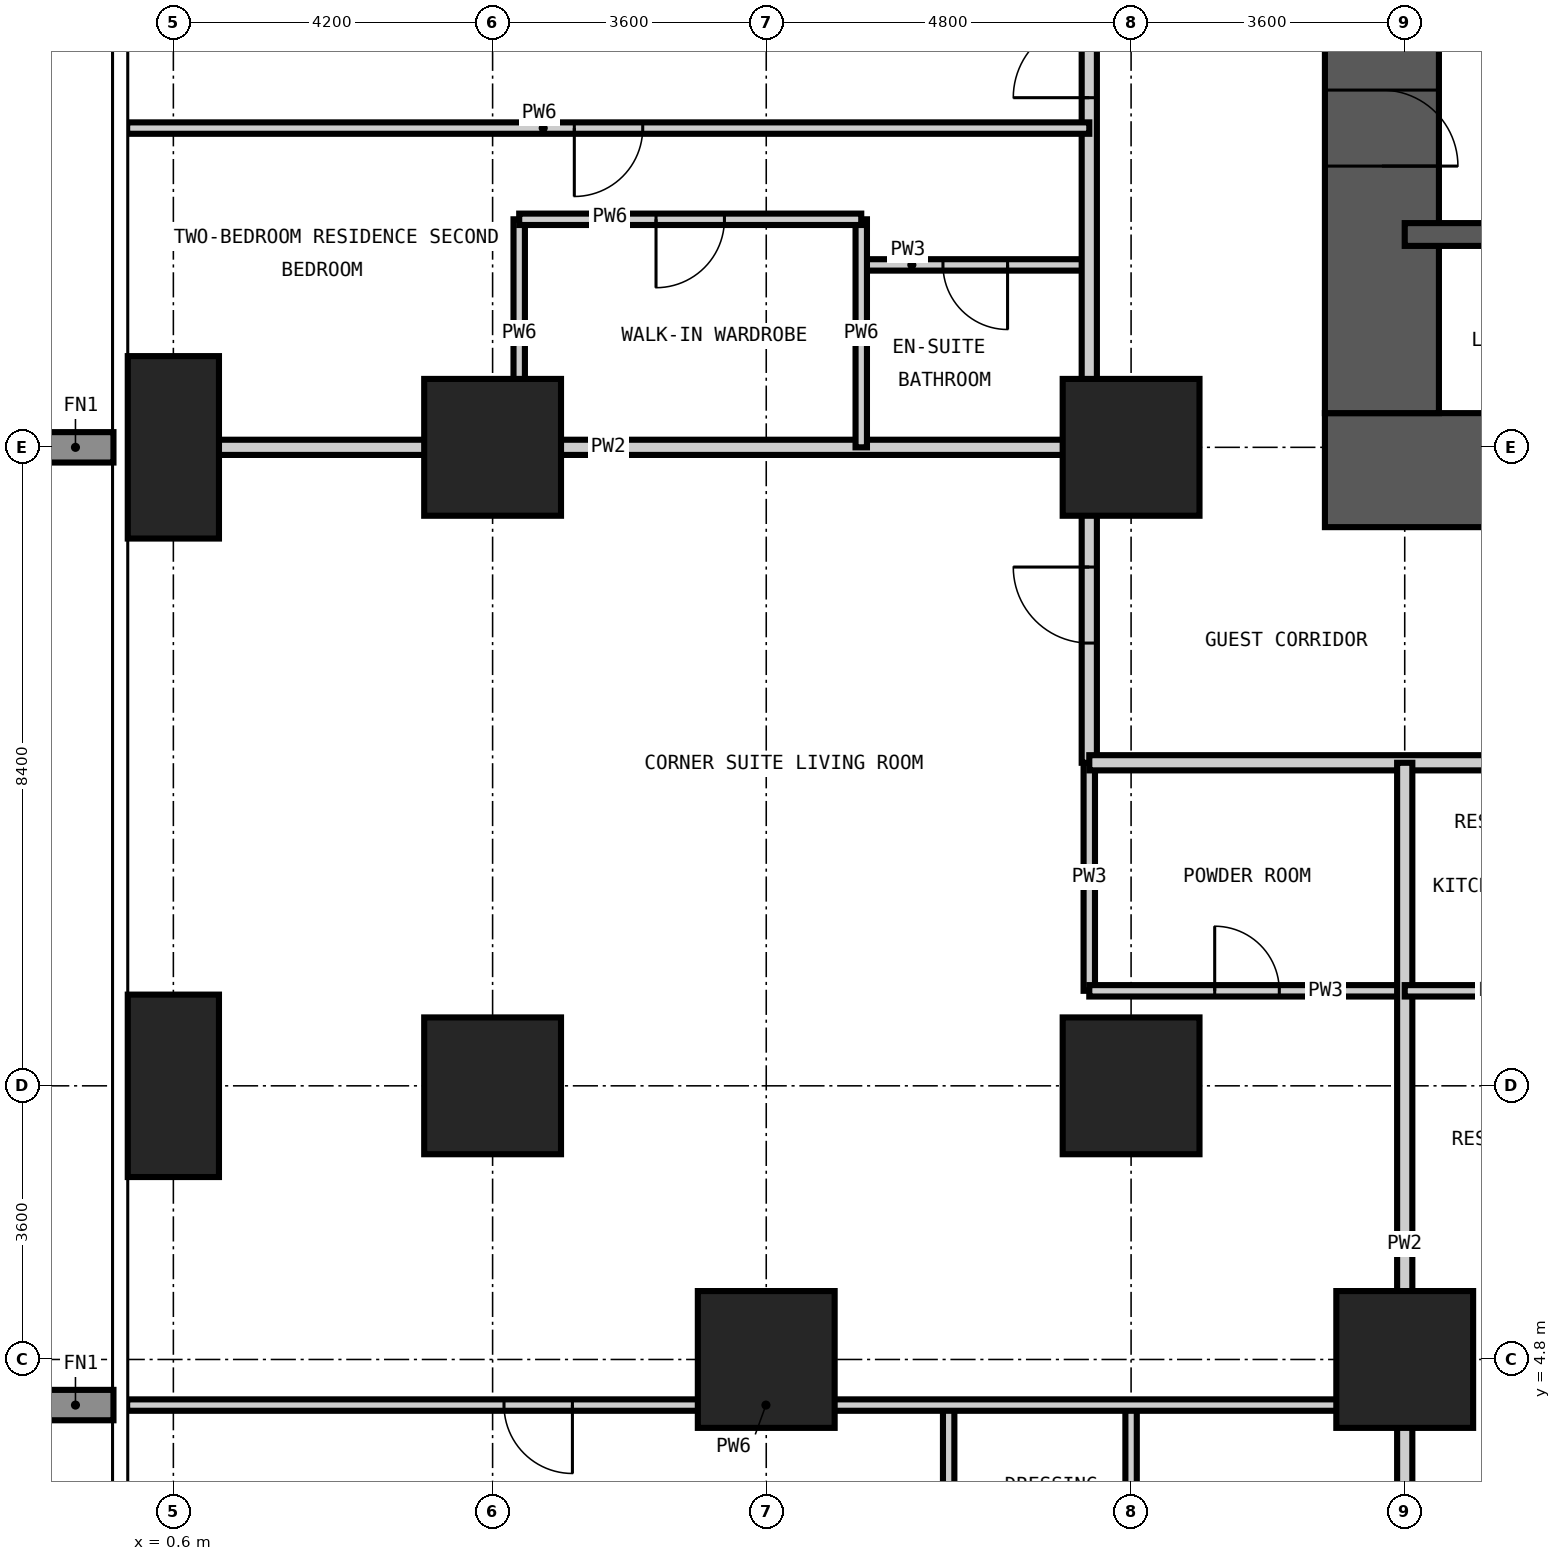
"""IFC4 building model, lengths in metres.
Left out: names, types, materials, properties, quantities, classifications, styles, units other than length and angle.
Written with IfcOpenShell. Run it as: python <this file> out.ifc"""

import sys

from ifc_helpers import new_model, si_unit, direction, frame, frame_2d, origin, origin_2d, place, context, subcontext, project, spatial, rectangle, extrude, element, fill, save


model = new_model("IFC4")
c1 = context("Model", 3, precision=1e-05, world=origin(), true_north=direction((0.0, 1.0)))
c2 = subcontext(c1, "Body", "Model", "MODEL_VIEW")
j1 = project(units=[si_unit("LENGTHUNIT", "METRE"), si_unit("PLANEANGLEUNIT", "RADIAN")], contexts=[c1])
p1 = place(None, origin())
s1 = spatial("IfcSite", under=j1, at=p1, CompositionType="ELEMENT")
p2 = place(p1, origin())
s2 = spatial("IfcBuilding", under=s1, at=p2, CompositionType="ELEMENT")
p3 = place(p2, frame((0.0, 0.0, 52.2)))
s3 = spatial("IfcBuildingStorey", under=s2, at=p3, CompositionType="ELEMENT", Elevation=52.2)
for number, where, z_axis, x_axis in (
    (1, (0.6, 8.4, -0.35), (0.0, 0.0, 1.0), (1.0, 0.0, 0.0)),
    (2, (0.6, 16.8, -0.35), (0.0, 0.0, 1.0), (1.0, 0.0, 0.0)),
):
    element("IfcColumn", number, at=place(p3, frame(where, z_axis=z_axis, x_axis=x_axis)), inside=s3, PredefinedType="COLUMN", context=c2, shape_type="SweptSolid", body=[
        extrude(rectangle(XDim=1.2, YDim=2.4, at=origin_2d()), origin(), (0.0, 0.0, 1.0), 3.6),
    ])
for number, where, z_axis, x_axis in (
    (3, (4.8, 8.4, -0.35), (0.0, 0.0, 1.0), (1.0, 0.0, 0.0)),
    (4, (4.8, 16.8, -0.35), (0.0, 0.0, 1.0), (1.0, 0.0, 0.0)),
    (5, (8.4, 4.8, -0.35), (0.0, 0.0, 1.0), (1.0, 0.0, 0.0)),
    (6, (13.2, 8.4, -0.35), (0.0, 0.0, 1.0), (1.0, 0.0, 0.0)),
    (7, (13.2, 16.8, -0.35), (0.0, 0.0, 1.0), (1.0, 0.0, 0.0)),
    (8, (16.8, 4.8, -0.35), (0.0, 0.0, 1.0), (1.0, 0.0, 0.0)),
):
    element("IfcColumn", number, at=place(p3, frame(where, z_axis=z_axis, x_axis=x_axis)), inside=s3, PredefinedType="COLUMN", context=c2, shape_type="SweptSolid", body=[
        extrude(rectangle(XDim=1.8, YDim=1.8, at=origin_2d()), origin(), (0.0, 0.0, 1.0), 3.6),
    ])
p4 = place(p3, frame((15.75, 16.5, -0.35), z_axis=(0.0, 0.0, 1.0), x_axis=(1.0, 0.0, 0.0)))
e9 = element("IfcWall", 9, at=p4, inside=s3, PredefinedType="SHEAR", context=c2, shape_type="SweptSolid", body=[
    extrude(rectangle(XDim=27.3, YDim=1.5, at=frame_2d((13.65, 0.0))), origin(), (0.0, 0.0, 1.0), 3.6),
])
p5 = place(p4, frame((13.15, 0.0, 0.35)))
e10 = element("IfcOpeningElement", 10, at=p5, cuts=e9, PredefinedType="OPENING", context=c2, shape_type="SweptSolid", body=[
    extrude(rectangle(XDim=1.0, YDim=2.1, at=frame_2d((0.5, 1.05))), frame((0.0, 0.76, 0.0), z_axis=(0.0, -1.0, 0.0), x_axis=(1.0, 0.0, 0.0)), (0.0, 0.0, 1.0), 1.52),
])
p6 = place(p4, frame((19.45, 0.0, 0.35)))
e11 = element("IfcOpeningElement", 11, at=p6, cuts=e9, PredefinedType="OPENING", context=c2, shape_type="SweptSolid", body=[
    extrude(rectangle(XDim=1.0, YDim=2.1, at=frame_2d((0.5, 1.05))), frame((0.0, 0.76, 0.0), z_axis=(0.0, -1.0, 0.0), x_axis=(1.0, 0.0, 0.0)), (0.0, 0.0, 1.0), 1.52),
])
p7 = place(p3, frame((16.5, 41.55, -0.35), z_axis=(0.0, 0.0, 1.0), x_axis=(0.0, -1.0, 0.0)))
e12 = element("IfcWall", 12, at=p7, inside=s3, PredefinedType="SHEAR", context=c2, shape_type="SweptSolid", body=[
    extrude(rectangle(XDim=24.3, YDim=1.5, at=frame_2d((12.15, 0.0))), origin(), (0.0, 0.0, 1.0), 3.6),
])
p8 = place(p7, frame((11.25, 0.0, 0.35)))
e13 = element("IfcOpeningElement", 13, at=p8, cuts=e12, PredefinedType="OPENING", context=c2, shape_type="SweptSolid", body=[
    extrude(rectangle(XDim=1.8, YDim=2.2, at=frame_2d((0.9, 1.1))), frame((0.0, 0.76, 0.0), z_axis=(0.0, -1.0, 0.0), x_axis=(1.0, 0.0, 0.0)), (0.0, 0.0, 1.0), 1.52),
])
p9 = place(p7, frame((20.05, 0.0, 0.35)))
e14 = element("IfcOpeningElement", 14, at=p9, cuts=e12, PredefinedType="OPENING", context=c2, shape_type="SweptSolid", body=[
    extrude(rectangle(XDim=1.0, YDim=2.1, at=frame_2d((0.5, 1.05))), frame((0.0, 0.76, 0.0), z_axis=(0.0, -1.0, 0.0), x_axis=(1.0, 0.0, 0.0)), (0.0, 0.0, 1.0), 1.52),
])
p10 = place(p7, frame((5.35, 0.0, 0.35)))
e15 = element("IfcOpeningElement", 15, at=p10, cuts=e12, PredefinedType="OPENING", context=c2, shape_type="SweptSolid", body=[
    extrude(rectangle(XDim=1.0, YDim=2.1, at=frame_2d((0.5, 1.05))), frame((0.0, 0.76, 0.0), z_axis=(0.0, -1.0, 0.0), x_axis=(1.0, 0.0, 0.0)), (0.0, 0.0, 1.0), 1.52),
])
p11 = place(p3, frame((16.8, 19.6, -0.35), z_axis=(0.0, 0.0, 1.0), x_axis=(1.0, 0.0, 0.0)))
e16 = element("IfcWall", 16, at=p11, inside=s3, PredefinedType="SHEAR", context=c2, shape_type="SweptSolid", body=[
    extrude(rectangle(XDim=8.4, YDim=0.3, at=frame_2d((4.2, 0.0))), origin(), (0.0, 0.0, 1.0), 3.6),
])
p12 = place(p3, frame((12.65, 9.65, 0.0), z_axis=(0.0, 0.0, 1.0), x_axis=(0.0, 1.0, 0.0)))
e17 = element("IfcWall", 17, at=p12, inside=s3, PredefinedType="PARTITIONING", context=c2, shape_type="SweptSolid", body=[
    extrude(rectangle(XDim=3.0, YDim=0.15, at=frame_2d((1.5, 0.0))), origin(), (0.0, 0.0, 1.0), 3.25),
])
p13 = place(p3, frame((12.65, 9.65, 0.0), z_axis=(0.0, 0.0, 1.0), x_axis=(1.0, 0.0, 0.0)))
e18 = element("IfcWall", 18, at=p13, inside=s3, PredefinedType="PARTITIONING", context=c2, shape_type="SweptSolid", body=[
    extrude(rectangle(XDim=4.15, YDim=0.15, at=frame_2d((2.075, 0.0))), origin(), (0.0, 0.0, 1.0), 3.25),
])
p14 = place(p13, frame((1.65, 0.0, 0.0)))
e19 = element("IfcOpeningElement", 19, at=p14, cuts=e18, PredefinedType="OPENING", context=c2, shape_type="SweptSolid", body=[
    extrude(rectangle(XDim=0.85, YDim=2.1, at=frame_2d((0.425, 1.05))), frame((0.0, 0.085, 0.0), z_axis=(0.0, -1.0, 0.0), x_axis=(1.0, 0.0, 0.0)), (0.0, 0.0, 1.0), 0.17),
])
p15 = place(p3, frame((9.65, 19.2, 0.0), z_axis=(0.0, 0.0, 1.0), x_axis=(1.0, 0.0, 0.0)))
e20 = element("IfcWall", 20, at=p15, inside=s3, PredefinedType="PARTITIONING", context=c2, shape_type="SweptSolid", body=[
    extrude(rectangle(XDim=3.0, YDim=0.15, at=frame_2d((1.5, 0.0))), origin(), (0.0, 0.0, 1.0), 3.25),
])
p16 = place(p15, frame((1.075, 0.0, 0.0)))
e21 = element("IfcOpeningElement", 21, at=p16, cuts=e20, PredefinedType="OPENING", context=c2, shape_type="SweptSolid", body=[
    extrude(rectangle(XDim=0.85, YDim=2.1, at=frame_2d((0.425, 1.05))), frame((0.0, 0.085, 0.0), z_axis=(0.0, -1.0, 0.0), x_axis=(1.0, 0.0, 0.0)), (0.0, 0.0, 1.0), 0.17),
])
p17 = place(p3, frame((12.65, 12.65, 0.0), z_axis=(0.0, 0.0, 1.0), x_axis=(0.0, 1.0, 0.0)))
e22 = element("IfcWall", 22, at=p17, inside=s3, PredefinedType="PARTITIONING", context=c2, shape_type="SweptSolid", body=[
    extrude(rectangle(XDim=32.9, YDim=0.2, at=frame_2d((16.45, 0.0))), origin(), (0.0, 0.0, 1.0), 3.25),
])
p18 = place(p17, frame((8.75, 0.0, 0.0)))
e23 = element("IfcOpeningElement", 23, at=p18, cuts=e22, PredefinedType="OPENING", context=c2, shape_type="SweptSolid", body=[
    extrude(rectangle(XDim=1.0, YDim=2.2, at=frame_2d((0.5, 1.1))), frame((0.0, 0.11, 0.0), z_axis=(0.0, -1.0, 0.0), x_axis=(1.0, 0.0, 0.0)), (0.0, 0.0, 1.0), 0.22),
])
p19 = place(p17, frame((17.0, 0.0, 0.0)))
e24 = element("IfcOpeningElement", 24, at=p19, cuts=e22, PredefinedType="OPENING", context=c2, shape_type="SweptSolid", body=[
    extrude(rectangle(XDim=1.0, YDim=2.2, at=frame_2d((0.5, 1.1))), frame((0.0, 0.11, 0.0), z_axis=(0.0, -1.0, 0.0), x_axis=(1.0, 0.0, 0.0)), (0.0, 0.0, 1.0), 0.22),
])
p20 = place(p17, frame((23.9, 0.0, 0.0)))
e25 = element("IfcOpeningElement", 25, at=p20, cuts=e22, PredefinedType="OPENING", context=c2, shape_type="SweptSolid", body=[
    extrude(rectangle(XDim=1.0, YDim=2.2, at=frame_2d((0.5, 1.1))), frame((0.0, 0.11, 0.0), z_axis=(0.0, -1.0, 0.0), x_axis=(1.0, 0.0, 0.0)), (0.0, 0.0, 1.0), 0.22),
])
p21 = place(p17, frame((25.4, 0.0, 0.0)))
e26 = element("IfcOpeningElement", 26, at=p21, cuts=e22, PredefinedType="OPENING", context=c2, shape_type="SweptSolid", body=[
    extrude(rectangle(XDim=1.0, YDim=2.2, at=frame_2d((0.5, 1.1))), frame((0.0, 0.11, 0.0), z_axis=(0.0, -1.0, 0.0), x_axis=(1.0, 0.0, 0.0)), (0.0, 0.0, 1.0), 0.22),
])
p22 = place(p17, frame((1.575, 0.0, 0.0)))
e27 = element("IfcOpeningElement", 27, at=p22, cuts=e22, PredefinedType="OPENING", context=c2, shape_type="SweptSolid", body=[
    extrude(rectangle(XDim=1.0, YDim=2.2, at=frame_2d((0.5, 1.1))), frame((0.0, 0.11, 0.0), z_axis=(0.0, -1.0, 0.0), x_axis=(1.0, 0.0, 0.0)), (0.0, 0.0, 1.0), 0.22),
])
p23 = place(p17, frame((30.625, 0.0, 0.0)))
e28 = element("IfcOpeningElement", 28, at=p23, cuts=e22, PredefinedType="OPENING", context=c2, shape_type="SweptSolid", body=[
    extrude(rectangle(XDim=1.0, YDim=2.2, at=frame_2d((0.5, 1.1))), frame((0.0, 0.11, 0.0), z_axis=(0.0, -1.0, 0.0), x_axis=(1.0, 0.0, 0.0)), (0.0, 0.0, 1.0), 0.22),
])
p24 = place(p3, frame((44.95, 12.65, 0.0), z_axis=(0.0, 0.0, 1.0), x_axis=(-1.0, 0.0, 0.0)))
e29 = element("IfcWall", 29, at=p24, inside=s3, PredefinedType="PARTITIONING", context=c2, shape_type="SweptSolid", body=[
    extrude(rectangle(XDim=32.3, YDim=0.2, at=frame_2d((16.15, 0.0))), origin(), (0.0, 0.0, 1.0), 3.25),
])
p25 = place(p24, frame((24.35, 0.0, 0.0)))
e30 = element("IfcOpeningElement", 30, at=p25, cuts=e29, PredefinedType="OPENING", context=c2, shape_type="SweptSolid", body=[
    extrude(rectangle(XDim=1.0, YDim=2.2, at=frame_2d((0.5, 1.1))), frame((0.0, 0.11, 0.0), z_axis=(0.0, -1.0, 0.0), x_axis=(1.0, 0.0, 0.0)), (0.0, 0.0, 1.0), 0.22),
])
p26 = place(p24, frame((15.95, 0.0, 0.0)))
e31 = element("IfcOpeningElement", 31, at=p26, cuts=e29, PredefinedType="OPENING", context=c2, shape_type="SweptSolid", body=[
    extrude(rectangle(XDim=1.0, YDim=2.2, at=frame_2d((0.5, 1.1))), frame((0.0, 0.11, 0.0), z_axis=(0.0, -1.0, 0.0), x_axis=(1.0, 0.0, 0.0)), (0.0, 0.0, 1.0), 0.22),
])
p27 = place(p24, frame((7.55, 0.0, 0.0)))
e32 = element("IfcOpeningElement", 32, at=p27, cuts=e29, PredefinedType="OPENING", context=c2, shape_type="SweptSolid", body=[
    extrude(rectangle(XDim=1.0, YDim=2.2, at=frame_2d((0.5, 1.1))), frame((0.0, 0.11, 0.0), z_axis=(0.0, -1.0, 0.0), x_axis=(1.0, 0.0, 0.0)), (0.0, 0.0, 1.0), 0.22),
])
for number, where, z_axis, x_axis in (
    (33, (16.8, -0.008, 0.0), (0.0, 0.0, 1.0), (0.0, 1.0, 0.0)),
    (34, (-0.008, 16.8, 0.0), (0.0, 0.0, 1.0), (1.0, 0.0, 0.0)),
):
    element("IfcWall", number, at=place(p3, frame(where, z_axis=z_axis, x_axis=x_axis)), inside=s3, PredefinedType="PARTITIONING", context=c2, shape_type="SweptSolid", body=[
        extrude(rectangle(XDim=12.658, YDim=0.2, at=frame_2d((6.329, 0.0))), origin(), (0.0, 0.0, 1.0), 3.25),
    ])
for number, where, z_axis, x_axis in (
    (35, (5.15, 16.8, 0.0), (0.0, 0.0, 1.0), (0.0, 1.0, 0.0)),
    (36, (9.65, 16.8, 0.0), (0.0, 0.0, 1.0), (0.0, 1.0, 0.0)),
):
    element("IfcWall", number, at=place(p3, frame(where, z_axis=z_axis, x_axis=x_axis)), inside=s3, PredefinedType="PARTITIONING", context=c2, shape_type="SweptSolid", body=[
        extrude(rectangle(XDim=3.0, YDim=0.15, at=frame_2d((1.5, 0.0))), origin(), (0.0, 0.0, 1.0), 3.25),
    ])
p28 = place(p3, frame((10.8, 1.2, 0.0), z_axis=(0.0, 0.0, 1.0), x_axis=(0.0, 1.0, 0.0)))
e37 = element("IfcWall", 37, at=p28, inside=s3, PredefinedType="PARTITIONING", context=c2, shape_type="SweptSolid", body=[
    extrude(rectangle(XDim=3.0, YDim=0.15, at=frame_2d((1.5, 0.0))), origin(), (0.0, 0.0, 1.0), 3.25),
])
p29 = place(p28, frame((1.05, 0.0, 0.0)))
e38 = element("IfcOpeningElement", 38, at=p29, cuts=e37, PredefinedType="OPENING", context=c2, shape_type="SweptSolid", body=[
    extrude(rectangle(XDim=0.9, YDim=2.1, at=frame_2d((0.45, 1.05))), frame((0.0, 0.085, 0.0), z_axis=(0.0, -1.0, 0.0), x_axis=(1.0, 0.0, 0.0)), (0.0, 0.0, 1.0), 0.17),
])
p30 = place(p3, frame((13.2, 1.2, 0.0), z_axis=(0.0, 0.0, 1.0), x_axis=(0.0, 1.0, 0.0)))
e39 = element("IfcWall", 39, at=p30, inside=s3, PredefinedType="PARTITIONING", context=c2, shape_type="SweptSolid", body=[
    extrude(rectangle(XDim=3.0, YDim=0.15, at=frame_2d((1.5, 0.0))), origin(), (0.0, 0.0, 1.0), 3.25),
])
p31 = place(p3, frame((-0.008, 4.2, 0.0), z_axis=(0.0, 0.0, 1.0), x_axis=(1.0, 0.0, 0.0)))
e40 = element("IfcWall", 40, at=p31, inside=s3, PredefinedType="PARTITIONING", context=c2, shape_type="SweptSolid", body=[
    extrude(rectangle(XDim=16.808, YDim=0.15, at=frame_2d((8.404, 0.0))), origin(), (0.0, 0.0, 1.0), 3.25),
])
p32 = place(p31, frame((4.958, 0.0, 0.0)))
e41 = element("IfcOpeningElement", 41, at=p32, cuts=e40, PredefinedType="OPENING", context=c2, shape_type="SweptSolid", body=[
    extrude(rectangle(XDim=0.9, YDim=2.1, at=frame_2d((0.45, 1.05))), frame((0.0, 0.085, 0.0), z_axis=(0.0, -1.0, 0.0), x_axis=(1.0, 0.0, 0.0)), (0.0, 0.0, 1.0), 0.17),
])
p33 = place(p3, frame((16.8, 9.65, 0.0), z_axis=(0.0, 0.0, 1.0), x_axis=(1.0, 0.0, 0.0)))
e42 = element("IfcWall", 42, at=p33, inside=s3, PredefinedType="PARTITIONING", context=c2, shape_type="SweptSolid", body=[
    extrude(rectangle(XDim=2.4, YDim=0.15, at=frame_2d((1.2, 0.0))), origin(), (0.0, 0.0, 1.0), 3.25),
])
p34 = place(p3, frame((5.15, 19.8, 0.0), z_axis=(0.0, 0.0, 1.0), x_axis=(1.0, 0.0, 0.0)))
e43 = element("IfcWall", 43, at=p34, inside=s3, PredefinedType="PARTITIONING", context=c2, shape_type="SweptSolid", body=[
    extrude(rectangle(XDim=4.5, YDim=0.15, at=frame_2d((2.25, 0.0))), origin(), (0.0, 0.0, 1.0), 3.25),
])
p35 = place(p34, frame((1.8, 0.0, 0.0)))
e44 = element("IfcOpeningElement", 44, at=p35, cuts=e43, PredefinedType="OPENING", context=c2, shape_type="SweptSolid", body=[
    extrude(rectangle(XDim=0.9, YDim=2.1, at=frame_2d((0.45, 1.05))), frame((0.0, 0.085, 0.0), z_axis=(0.0, -1.0, 0.0), x_axis=(1.0, 0.0, 0.0)), (0.0, 0.0, 1.0), 0.17),
])
p36 = place(p3, frame((-0.008, 21.0, 0.0), z_axis=(0.0, 0.0, 1.0), x_axis=(1.0, 0.0, 0.0)))
e45 = element("IfcWall", 45, at=p36, inside=s3, PredefinedType="PARTITIONING", context=c2, shape_type="SweptSolid", body=[
    extrude(rectangle(XDim=12.658, YDim=0.15, at=frame_2d((6.329, 0.0))), origin(), (0.0, 0.0, 1.0), 3.25),
])
p37 = place(p36, frame((5.883, 0.0, 0.0)))
e46 = element("IfcOpeningElement", 46, at=p37, cuts=e45, PredefinedType="OPENING", context=c2, shape_type="SweptSolid", body=[
    extrude(rectangle(XDim=0.9, YDim=2.1, at=frame_2d((0.45, 1.05))), frame((0.0, 0.085, 0.0), z_axis=(0.0, -1.0, 0.0), x_axis=(1.0, 0.0, 0.0)), (0.0, 0.0, 1.0), 0.17),
])
p38 = place(p18, origin())
e47 = element("IfcDoor", 47, at=p38, inside=s3, OperationType="SINGLE_SWING_LEFT", PredefinedType="DOOR", context=c2, shape_type="SweptSolid", body=[
    extrude(rectangle(XDim=1.0, YDim=2.2, at=frame_2d((0.5, 1.1))), frame((0.0, 0.025, 0.0), z_axis=(0.0, -1.0, 0.0), x_axis=(1.0, 0.0, 0.0)), (0.0, 0.0, 1.0), 0.05),
])
fill(e23, e47)
p39 = place(p37, frame((0.9, 0.0, 0.0), z_axis=(0.0, 0.0, 1.0), x_axis=(-1.0, 0.0, 0.0)))
e48 = element("IfcDoor", 48, at=p39, inside=s3, OperationType="SINGLE_SWING_RIGHT", PredefinedType="DOOR", context=c2, shape_type="SweptSolid", body=[
    extrude(rectangle(XDim=0.9, YDim=2.1, at=frame_2d((0.45, 1.05))), frame((0.0, 0.025, 0.0), z_axis=(0.0, -1.0, 0.0), x_axis=(1.0, 0.0, 0.0)), (0.0, 0.0, 1.0), 0.05),
])
fill(e46, e48)
p40 = place(p16, frame((0.85, 0.0, 0.0), z_axis=(0.0, 0.0, 1.0), x_axis=(-1.0, 0.0, 0.0)))
e49 = element("IfcDoor", 49, at=p40, inside=s3, OperationType="SINGLE_SWING_LEFT", PredefinedType="DOOR", context=c2, shape_type="SweptSolid", body=[
    extrude(rectangle(XDim=0.85, YDim=2.1, at=frame_2d((0.425, 1.05))), frame((0.0, 0.025, 0.0), z_axis=(0.0, -1.0, 0.0), x_axis=(1.0, 0.0, 0.0)), (0.0, 0.0, 1.0), 0.05),
])
fill(e21, e49)
p41 = place(p35, frame((0.9, 0.0, 0.0), z_axis=(0.0, 0.0, 1.0), x_axis=(-1.0, 0.0, 0.0)))
e50 = element("IfcDoor", 50, at=p41, inside=s3, OperationType="SINGLE_SWING_RIGHT", PredefinedType="DOOR", context=c2, shape_type="SweptSolid", body=[
    extrude(rectangle(XDim=0.9, YDim=2.1, at=frame_2d((0.45, 1.05))), frame((0.0, 0.025, 0.0), z_axis=(0.0, -1.0, 0.0), x_axis=(1.0, 0.0, 0.0)), (0.0, 0.0, 1.0), 0.05),
])
fill(e44, e50)
p42 = place(p22, origin())
e51 = element("IfcDoor", 51, at=p42, inside=s3, OperationType="SINGLE_SWING_RIGHT", PredefinedType="DOOR", context=c2, shape_type="SweptSolid", body=[
    extrude(rectangle(XDim=1.0, YDim=2.2, at=frame_2d((0.5, 1.1))), frame((0.0, 0.025, 0.0), z_axis=(0.0, -1.0, 0.0), x_axis=(1.0, 0.0, 0.0)), (0.0, 0.0, 1.0), 0.05),
])
fill(e27, e51)
p43 = place(p14, origin())
e52 = element("IfcDoor", 52, at=p43, inside=s3, OperationType="SINGLE_SWING_LEFT", PredefinedType="DOOR", context=c2, shape_type="SweptSolid", body=[
    extrude(rectangle(XDim=0.85, YDim=2.1, at=frame_2d((0.425, 1.05))), frame((0.0, 0.025, 0.0), z_axis=(0.0, -1.0, 0.0), x_axis=(1.0, 0.0, 0.0)), (0.0, 0.0, 1.0), 0.05),
])
fill(e19, e52)
p44 = place(p32, frame((0.9, 0.0, 0.0), z_axis=(0.0, 0.0, 1.0), x_axis=(-1.0, 0.0, 0.0)))
e53 = element("IfcDoor", 53, at=p44, inside=s3, OperationType="SINGLE_SWING_LEFT", PredefinedType="DOOR", context=c2, shape_type="SweptSolid", body=[
    extrude(rectangle(XDim=0.9, YDim=2.1, at=frame_2d((0.45, 1.05))), frame((0.0, 0.025, 0.0), z_axis=(0.0, -1.0, 0.0), x_axis=(1.0, 0.0, 0.0)), (0.0, 0.0, 1.0), 0.05),
])
fill(e41, e53)
p45 = place(p9, origin())
e54 = element("IfcDoor", 54, at=p45, inside=s3, OperationType="SINGLE_SWING_RIGHT", PredefinedType="DOOR", context=c2, shape_type="SweptSolid", body=[
    extrude(rectangle(XDim=1.0, YDim=2.1, at=frame_2d((0.5, 1.05))), frame((0.0, 0.025, 0.0), z_axis=(0.0, -1.0, 0.0), x_axis=(1.0, 0.0, 0.0)), (0.0, 0.0, 1.0), 0.05),
])
fill(e14, e54)
save(model, sys.argv[1])
